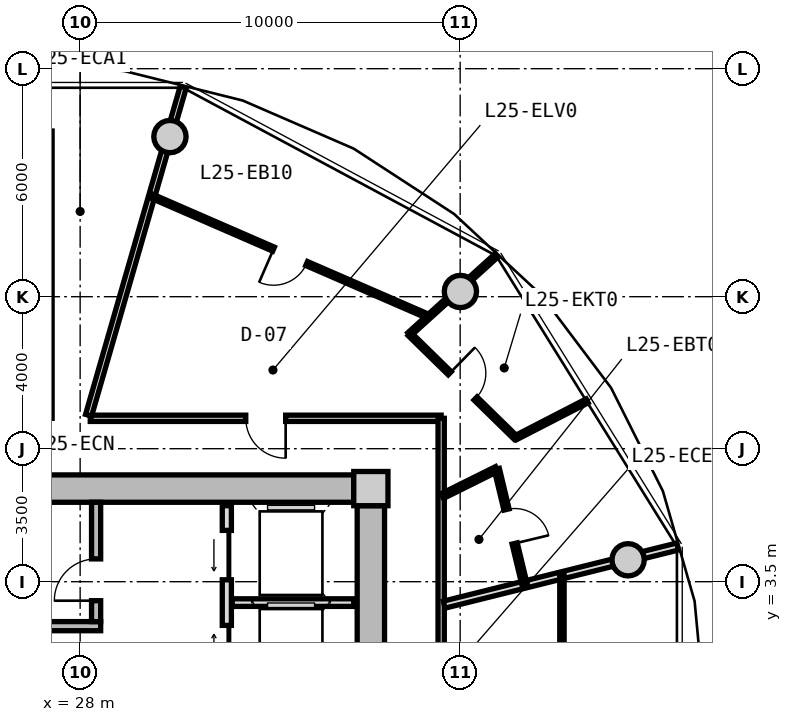
"""IFC4 building model, lengths in metres.
Left out: names, types, materials, properties, quantities, classifications, styles, units other than length and angle.
Written with IfcOpenShell. Run it as: python <this file> out.ifc"""

import sys

from ifc_helpers import new_model, si_unit, direction, frame, frame_2d, origin, origin_2d, place, context, subcontext, project, spatial, rectangle, circle, extrude, source, transform, mapped, element, fill, save


model = new_model("IFC4")
c1 = context("Model", 3, precision=1e-05, world=origin(), true_north=direction((0.0, 1.0)))
c2 = subcontext(c1, "Body", "Model", "MODEL_VIEW")
j1 = project(units=[si_unit("LENGTHUNIT", "METRE"), si_unit("PLANEANGLEUNIT", "RADIAN")], contexts=[c1])
p1 = place(None, origin())
s1 = spatial("IfcSite", under=j1, at=p1, CompositionType="ELEMENT")
p2 = place(p1, origin())
s2 = spatial("IfcBuilding", under=s1, at=p2, CompositionType="ELEMENT")
p3 = place(p2, frame((0.0, 0.0, 84.05)))
s3 = spatial("IfcBuildingStorey", under=s2, at=p3, CompositionType="ELEMENT", Elevation=84.05)
m1 = source(origin(), c2, "Body", "SweptSolid", [
    extrude(rectangle(XDim=0.9, YDim=0.9, at=origin_2d()), origin(), (0.0, 0.0, 1.0), 3.05),
])
p4 = place(p3, frame((35.65, 5.95, 0.0), z_axis=(0.0, 0.0, 1.0), x_axis=(1.0, 0.0, 0.0)))
e1 = element("IfcColumn", 1, at=p4, inside=s3, PredefinedType="COLUMN", context=c2, shape_type="MappedRepresentation", body=[
    mapped(m1, transform((0.0, 0.0, 0.0), x_axis=(1.0, 0.0, 0.0), y_axis=(0.0, 1.0, 0.0), z_axis=(0.0, 0.0, 1.0), scale=1.0)),
])
m2 = source(origin(), c2, "Body", "SweptSolid", [
    extrude(rectangle(XDim=14.4, YDim=0.72, at=frame_2d((7.2, 0.0))), origin(), (0.0, 0.0, 1.0), 2.79),
])
p5 = place(p3, frame((20.8, 5.95, 0.0), z_axis=(0.0, 0.0, 1.0), x_axis=(1.0, 0.0, 0.0)))
e2 = element("IfcWall", 2, at=p5, inside=s3, PredefinedType="SHEAR", context=c2, shape_type="MappedRepresentation", body=[
    mapped(m2, transform((0.0, 0.0, 0.0), x_axis=(1.0, 0.0, 0.0), y_axis=(0.0, 1.0, 0.0), z_axis=(0.0, 0.0, 1.0), scale=1.0)),
])
m3 = source(origin(), c2, "Body", "SweptSolid", [
    extrude(rectangle(XDim=11.0, YDim=0.72, at=frame_2d((5.5, 0.0))), origin(), (0.0, 0.0, 1.0), 2.79),
])
p6 = place(p3, frame((35.65, 5.5, 0.0), z_axis=(0.0, 0.0, 1.0), x_axis=(0.0, -1.0, 0.0)))
e3 = element("IfcWall", 3, at=p6, inside=s3, PredefinedType="SHEAR", context=c2, shape_type="MappedRepresentation", body=[
    mapped(m3, transform((0.0, 0.0, 0.0), x_axis=(1.0, 0.0, 0.0), y_axis=(0.0, 1.0, 0.0), z_axis=(0.0, 0.0, 1.0), scale=1.0)),
])
p7 = place(p6, frame((5.65, 0.0, 0.0)))
e4 = element("IfcOpeningElement", 4, at=p7, cuts=e3, PredefinedType="OPENING", context=c2, shape_type="SweptSolid", body=[
    extrude(rectangle(XDim=1.2, YDim=2.15, at=frame_2d((0.6, 1.075))), frame((0.0, 0.37, 0.0), z_axis=(0.0, -1.0, 0.0), x_axis=(1.0, 0.0, 0.0)), (0.0, 0.0, 1.0), 0.74),
])
m4 = source(origin(), c2, "Body", "SweptSolid", [
    extrude(circle(Radius=0.425, at=origin_2d()), origin(), (0.0, 0.0, 1.0), 3.05),
])
for number, where, z_axis, x_axis in (
    (5, (42.419, 4.076, 0.0), (0.0, 0.0, 1.0), (1.0, 0.0, 0.0)),
    (6, (38.006, 11.137, 0.0), (0.0, 0.0, 1.0), (1.0, 0.0, 0.0)),
    (7, (30.363, 15.213, 0.0), (0.0, 0.0, 1.0), (1.0, 0.0, 0.0)),
):
    element("IfcColumn", number, at=place(p3, frame(where, z_axis=z_axis, x_axis=x_axis)), inside=s3, PredefinedType="COLUMN", context=c2, shape_type="MappedRepresentation", body=[
        mapped(m4, transform((0.0, 0.0, 0.0), x_axis=(1.0, 0.0, 0.0), y_axis=(0.0, 1.0, 0.0), z_axis=(0.0, 0.0, 1.0), scale=1.0)),
    ])
m5 = source(origin(), c2, "Body", "SweptSolid", [
    extrude(rectangle(XDim=7.83, YDim=0.24, at=frame_2d((3.915, 0.0))), origin(), (0.0, 0.0, 1.0), 2.79),
])
p8 = place(p3, frame((20.71, 2.33, 0.0), z_axis=(0.0, 0.0, 1.0), x_axis=(1.0, 0.0, 0.0)))
e8 = element("IfcWall", 8, at=p8, inside=s3, PredefinedType="PARTITIONING", context=c2, shape_type="MappedRepresentation", body=[
    mapped(m5, transform((0.0, 0.0, 0.0), x_axis=(1.0, 0.0, 0.0), y_axis=(0.0, 1.0, 0.0), z_axis=(0.0, 0.0, 1.0), scale=1.0)),
])
m6 = source(origin(), c2, "Body", "SweptSolid", [
    extrude(rectangle(XDim=3.14, YDim=0.24, at=frame_2d((1.57, 0.0))), origin(), (0.0, 0.0, 1.0), 2.79),
])
p9 = place(p3, frame((28.42, 2.45, 0.0), z_axis=(0.0, 0.0, 1.0), x_axis=(0.0, 1.0, 0.0)))
e9 = element("IfcWall", 9, at=p9, inside=s3, PredefinedType="PARTITIONING", context=c2, shape_type="MappedRepresentation", body=[
    mapped(m6, transform((0.0, 0.0, 0.0), x_axis=(1.0, 0.0, 0.0), y_axis=(0.0, 1.0, 0.0), z_axis=(0.0, 0.0, 1.0), scale=1.0)),
])
p10 = place(p9, frame((0.55, 0.0, 0.0)))
e10 = element("IfcOpeningElement", 10, at=p10, cuts=e9, PredefinedType="OPENING", context=c2, shape_type="SweptSolid", body=[
    extrude(rectangle(XDim=1.1, YDim=2.15, at=frame_2d((0.55, 1.075))), frame((0.0, 0.13, 0.0), z_axis=(0.0, -1.0, 0.0), x_axis=(1.0, 0.0, 0.0)), (0.0, 0.0, 1.0), 0.26),
])
m7 = source(origin(), c2, "Body", "SweptSolid", [
    extrude(rectangle(XDim=5.0, YDim=0.24, at=frame_2d((2.5, 0.0))), origin(), (0.0, 0.0, 1.0), 2.775),
])
p11 = place(p3, frame((31.86, 0.5, 0.0), z_axis=(0.0, 0.0, 1.0), x_axis=(0.0, 1.0, 0.0)))
e11 = element("IfcWall", 11, at=p11, inside=s3, PredefinedType="PARTITIONING", context=c2, shape_type="MappedRepresentation", body=[
    mapped(m7, transform((0.0, 0.0, 0.0), x_axis=(1.0, 0.0, 0.0), y_axis=(0.0, 1.0, 0.0), z_axis=(0.0, 0.0, 1.0), scale=1.0)),
])
p12 = place(p11, frame((3.05, 0.0, 0.0)))
e12 = element("IfcOpeningElement", 12, at=p12, cuts=e11, PredefinedType="OPENING", context=c2, shape_type="SweptSolid", body=[
    extrude(rectangle(XDim=1.3, YDim=2.2, at=frame_2d((0.65, 1.1))), frame((0.0, 0.13, 0.0), z_axis=(0.0, -1.0, 0.0), x_axis=(1.0, 0.0, 0.0)), (0.0, 0.0, 1.0), 0.26),
])
p13 = place(p11, frame((0.55, 0.0, 0.0)))
e13 = element("IfcOpeningElement", 13, at=p13, cuts=e11, PredefinedType="OPENING", context=c2, shape_type="SweptSolid", body=[
    extrude(rectangle(XDim=1.3, YDim=2.2, at=frame_2d((0.65, 1.1))), frame((0.0, 0.13, 0.0), z_axis=(0.0, -1.0, 0.0), x_axis=(1.0, 0.0, 0.0)), (0.0, 0.0, 1.0), 0.26),
])
m8 = source(origin(), c2, "Body", "SweptSolid", [
    extrude(rectangle(XDim=3.2, YDim=0.2, at=frame_2d((1.6, 0.0))), origin(), (0.0, 0.0, 1.0), 2.775),
])
p14 = place(p3, frame((32.0, 2.95, 0.0), z_axis=(0.0, 0.0, 1.0), x_axis=(1.0, 0.0, 0.0)))
e14 = element("IfcWall", 14, at=p14, inside=s3, PredefinedType="PARTITIONING", context=c2, shape_type="MappedRepresentation", body=[
    mapped(m8, transform((0.0, 0.0, 0.0), x_axis=(1.0, 0.0, 0.0), y_axis=(0.0, 1.0, 0.0), z_axis=(0.0, 0.0, 1.0), scale=1.0)),
])
m9 = source(origin(), c2, "Body", "SweptSolid", [
    extrude(rectangle(XDim=9.234, YDim=0.165, at=frame_2d((4.617, 0.0))), origin(), (0.0, 0.0, 1.0), 2.775),
])
p15 = place(p3, frame((28.266, 7.8, 0.0), z_axis=(0.0, 0.0, 1.0), x_axis=(1.0, 0.0, 0.0)))
e15 = element("IfcWall", 15, at=p15, inside=s3, PredefinedType="PARTITIONING", context=c2, shape_type="MappedRepresentation", body=[
    mapped(m9, transform((0.0, 0.0, 0.0), x_axis=(1.0, 0.0, 0.0), y_axis=(0.0, 1.0, 0.0), z_axis=(0.0, 0.0, 1.0), scale=1.0)),
])
p16 = place(p15, frame((4.092, 0.0, 0.0)))
e16 = element("IfcOpeningElement", 16, at=p16, cuts=e15, PredefinedType="OPENING", context=c2, shape_type="SweptSolid", body=[
    extrude(rectangle(XDim=1.05, YDim=2.15, at=frame_2d((0.525, 1.075))), frame((0.0, 0.093, 0.0), z_axis=(0.0, -1.0, 0.0), x_axis=(1.0, 0.0, 0.0)), (0.0, 0.0, 1.0), 0.185),
])
m10 = source(origin(), c2, "Body", "SweptSolid", [
    extrude(rectangle(XDim=15.6, YDim=0.165, at=frame_2d((7.8, 0.0))), origin(), (0.0, 0.0, 1.0), 2.775),
])
p17 = place(p3, frame((37.5, 7.8, 0.0), z_axis=(0.0, 0.0, 1.0), x_axis=(0.0, -1.0, 0.0)))
e17 = element("IfcWall", 17, at=p17, inside=s3, PredefinedType="PARTITIONING", context=c2, shape_type="MappedRepresentation", body=[
    mapped(m10, transform((0.0, 0.0, 0.0), x_axis=(1.0, 0.0, 0.0), y_axis=(0.0, 1.0, 0.0), z_axis=(0.0, 0.0, 1.0), scale=1.0)),
])
p18 = place(p17, frame((9.177, 0.0, 0.0)))
e18 = element("IfcOpeningElement", 18, at=p18, cuts=e17, PredefinedType="OPENING", context=c2, shape_type="SweptSolid", body=[
    extrude(rectangle(XDim=1.05, YDim=2.15, at=frame_2d((0.525, 1.075))), frame((0.0, 0.093, 0.0), z_axis=(0.0, -1.0, 0.0), x_axis=(1.0, 0.0, 0.0)), (0.0, 0.0, 1.0), 0.185),
])
m11 = source(origin(), c2, "Body", "SweptSolid", [
    extrude(rectangle(XDim=8.989, YDim=0.165, at=frame_2d((4.495, 0.0))), origin(), (0.0, 0.0, 1.0), 2.275),
])
p19 = place(p3, frame((28.222, 7.88, 0.0), z_axis=(0.0, 0.0, 1.0), x_axis=(0.27702323008, 0.960863221274, 0.0)))
e19 = element("IfcWall", 19, at=p19, inside=s3, PredefinedType="PARTITIONING", context=c2, shape_type="MappedRepresentation", body=[
    mapped(m11, transform((0.0, 0.0, 0.0), x_axis=(1.0, 0.0, 0.0), y_axis=(0.0, 1.0, 0.0), z_axis=(0.0, 0.0, 1.0), scale=1.0)),
])
m12 = source(origin(), c2, "Body", "SweptSolid", [
    extrude(rectangle(XDim=6.331, YDim=0.19, at=frame_2d((3.165, 0.0))), origin(), (0.0, 0.0, 1.0), 2.275),
])
p20 = place(p3, frame((37.58, 2.896, 0.0), z_axis=(0.0, 0.0, 1.0), x_axis=(0.97036440661, 0.241646267062, 0.0)))
e20 = element("IfcWall", 20, at=p20, inside=s3, PredefinedType="PARTITIONING", context=c2, shape_type="MappedRepresentation", body=[
    mapped(m12, transform((0.0, 0.0, 0.0), x_axis=(1.0, 0.0, 0.0), y_axis=(0.0, 1.0, 0.0), z_axis=(0.0, 0.0, 1.0), scale=1.0)),
])
m13 = source(origin(), c2, "Body", "SweptSolid", [
    extrude(rectangle(XDim=7.375, YDim=0.115, at=frame_2d((3.688, 0.0))), origin(), (0.0, 0.0, 1.0), 2.775),
])
p21 = place(p3, frame((40.678, -3.688, 0.0), z_axis=(0.0, 0.0, 1.0), x_axis=(0.0, 1.0, 0.0)))
e21 = element("IfcWall", 21, at=p21, inside=s3, PredefinedType="PARTITIONING", context=c2, shape_type="MappedRepresentation", body=[
    mapped(m13, transform((0.0, 0.0, 0.0), x_axis=(1.0, 0.0, 0.0), y_axis=(0.0, 1.0, 0.0), z_axis=(0.0, 0.0, 1.0), scale=1.0)),
])
p22 = place(p21, frame((3.213, 0.0, 0.0)))
e22 = element("IfcOpeningElement", 22, at=p22, cuts=e21, PredefinedType="OPENING", context=c2, shape_type="SweptSolid", body=[
    extrude(rectangle(XDim=0.95, YDim=2.1, at=frame_2d((0.475, 1.05))), frame((0.0, 0.067, 0.0), z_axis=(0.0, -1.0, 0.0), x_axis=(1.0, 0.0, 0.0)), (0.0, 0.0, 1.0), 0.135),
])
m14 = source(origin(), c2, "Body", "SweptSolid", [
    extrude(rectangle(XDim=7.938, YDim=0.115, at=frame_2d((3.969, 0.0))), origin(), (0.0, 0.0, 1.0), 2.775),
])
p23 = place(p3, frame((37.164, 10.479, 0.0), z_axis=(0.0, 0.0, 1.0), x_axis=(-0.917052940979, 0.398765474235, 0.0)))
e23 = element("IfcWall", 23, at=p23, inside=s3, PredefinedType="PARTITIONING", context=c2, shape_type="MappedRepresentation", body=[
    mapped(m14, transform((0.0, 0.0, 0.0), x_axis=(1.0, 0.0, 0.0), y_axis=(0.0, 1.0, 0.0), z_axis=(0.0, 0.0, 1.0), scale=1.0)),
])
p24 = place(p23, frame((3.494, 0.0, 0.0)))
e24 = element("IfcOpeningElement", 24, at=p24, cuts=e23, PredefinedType="OPENING", context=c2, shape_type="SweptSolid", body=[
    extrude(rectangle(XDim=0.95, YDim=2.1, at=frame_2d((0.475, 1.05))), frame((0.0, 0.067, 0.0), z_axis=(0.0, -1.0, 0.0), x_axis=(1.0, 0.0, 0.0)), (0.0, 0.0, 1.0), 0.135),
])
m15 = source(origin(), c2, "Body", "SweptSolid", [
    extrude(rectangle(XDim=3.102, YDim=0.115, at=frame_2d((1.551, 0.0))), origin(), (0.0, 0.0, 1.0), 2.275),
])
p25 = place(p3, frame((36.661, 10.01, 0.0), z_axis=(0.0, 0.0, 1.0), x_axis=(0.741263481794, 0.671214161471, 0.0)))
e25 = element("IfcWall", 25, at=p25, inside=s3, PredefinedType="PARTITIONING", context=c2, shape_type="MappedRepresentation", body=[
    mapped(m15, transform((0.0, 0.0, 0.0), x_axis=(1.0, 0.0, 0.0), y_axis=(0.0, 1.0, 0.0), z_axis=(0.0, 0.0, 1.0), scale=1.0)),
])
m16 = source(origin(), c2, "Body", "SweptSolid", [
    extrude(rectangle(XDim=1.6, YDim=0.14, at=frame_2d((0.8, 0.0))), origin(), (0.0, 0.0, 1.0), 2.775),
])
p26 = place(p3, frame((37.53, 5.754, 0.0), z_axis=(0.0, 0.0, 1.0), x_axis=(0.895522919837, 0.445015393044, 0.0)))
e26 = element("IfcWall", 26, at=p26, inside=s3, PredefinedType="PARTITIONING", context=c2, shape_type="MappedRepresentation", body=[
    mapped(m16, transform((0.0, 0.0, 0.0), x_axis=(1.0, 0.0, 0.0), y_axis=(0.0, 1.0, 0.0), z_axis=(0.0, 0.0, 1.0), scale=1.0)),
])
m17 = source(origin(), c2, "Body", "SweptSolid", [
    extrude(rectangle(XDim=3.112, YDim=0.14, at=frame_2d((1.556, 0.0))), origin(), (0.0, 0.0, 1.0), 2.415),
])
p27 = place(p3, frame((38.963, 6.466, 0.0), z_axis=(0.0, 0.0, 1.0), x_axis=(0.233737944029, -0.972299631555, 0.0)))
e27 = element("IfcWall", 27, at=p27, inside=s3, PredefinedType="PARTITIONING", context=c2, shape_type="MappedRepresentation", body=[
    mapped(m17, transform((0.0, 0.0, 0.0), x_axis=(1.0, 0.0, 0.0), y_axis=(0.0, 1.0, 0.0), z_axis=(0.0, 0.0, 1.0), scale=1.0)),
])
p28 = place(p27, frame((1.096, 0.0, 0.0)))
e28 = element("IfcOpeningElement", 28, at=p28, cuts=e27, PredefinedType="OPENING", context=c2, shape_type="SweptSolid", body=[
    extrude(rectangle(XDim=0.92, YDim=2.1, at=frame_2d((0.46, 1.05))), frame((0.0, 0.08, 0.0), z_axis=(0.0, -1.0, 0.0), x_axis=(1.0, 0.0, 0.0)), (0.0, 0.0, 1.0), 0.16),
])
m18 = source(origin(), c2, "Body", "SweptSolid", [
    extrude(rectangle(XDim=2.117, YDim=0.115, at=frame_2d((1.059, 0.0))), origin(), (0.0, 0.0, 1.0), 2.775),
])
p29 = place(p3, frame((39.46, 7.289, 0.0), z_axis=(0.0, 0.0, 1.0), x_axis=(0.888941834945, 0.45802010227, 0.0)))
e29 = element("IfcWall", 29, at=p29, inside=s3, PredefinedType="PARTITIONING", context=c2, shape_type="MappedRepresentation", body=[
    mapped(m18, transform((0.0, 0.0, 0.0), x_axis=(1.0, 0.0, 0.0), y_axis=(0.0, 1.0, 0.0), z_axis=(0.0, 0.0, 1.0), scale=1.0)),
])
m19 = source(origin(), c2, "Body", "SweptSolid", [
    extrude(rectangle(XDim=3.902, YDim=0.115, at=frame_2d((1.951, 0.0))), origin(), (0.0, 0.0, 1.0), 2.775),
])
p30 = place(p3, frame((39.46, 7.289, 0.0), z_axis=(0.0, 0.0, 1.0), x_axis=(-0.714853061854, 0.699274695637, 0.0)))
e30 = element("IfcWall", 30, at=p30, inside=s3, PredefinedType="PARTITIONING", context=c2, shape_type="MappedRepresentation", body=[
    mapped(m19, transform((0.0, 0.0, 0.0), x_axis=(1.0, 0.0, 0.0), y_axis=(0.0, 1.0, 0.0), z_axis=(0.0, 0.0, 1.0), scale=1.0)),
])
p31 = place(p30, frame((1.476, 0.0, 0.0)))
e31 = element("IfcOpeningElement", 31, at=p31, cuts=e30, PredefinedType="OPENING", context=c2, shape_type="SweptSolid", body=[
    extrude(rectangle(XDim=0.95, YDim=2.1, at=frame_2d((0.475, 1.05))), frame((0.0, 0.067, 0.0), z_axis=(0.0, -1.0, 0.0), x_axis=(1.0, 0.0, 0.0)), (0.0, 0.0, 1.0), 0.135),
])
m20 = source(origin(), c2, "Body", "SweptSolid", [
    extrude(rectangle(XDim=1.1, YDim=2.15, at=frame_2d((0.55, 1.075))), frame((0.0, 0.025, 0.0), z_axis=(0.0, -1.0, 0.0), x_axis=(1.0, 0.0, 0.0)), (0.0, 0.0, 1.0), 0.05),
])
p32 = place(p10, origin())
e32 = element("IfcDoor", 32, at=p32, inside=s3, OperationType="SINGLE_SWING_LEFT", PredefinedType="DOOR", context=c2, shape_type="MappedRepresentation", body=[
    mapped(m20, transform((0.0, 0.0, 0.0), x_axis=(1.0, 0.0, 0.0), y_axis=(0.0, 1.0, 0.0), z_axis=(0.0, 0.0, 1.0), scale=1.0)),
])
fill(e10, e32)
m21 = source(origin(), c2, "Body", "SweptSolid", [
    extrude(rectangle(XDim=1.3, YDim=2.2, at=frame_2d((0.65, 1.1))), frame((0.0, 0.025, 0.0), z_axis=(0.0, -1.0, 0.0), x_axis=(1.0, 0.0, 0.0)), (0.0, 0.0, 1.0), 0.05),
])
p33 = place(p12, origin())
e33 = element("IfcDoor", 33, at=p33, inside=s3, OperationType="SLIDING_TO_LEFT", PredefinedType="DOOR", context=c2, shape_type="MappedRepresentation", body=[
    mapped(m21, transform((0.0, 0.0, 0.0), x_axis=(1.0, 0.0, 0.0), y_axis=(0.0, 1.0, 0.0), z_axis=(0.0, 0.0, 1.0), scale=1.0)),
])
fill(e12, e33)
p34 = place(p13, origin())
e34 = element("IfcDoor", 34, at=p34, inside=s3, OperationType="SLIDING_TO_RIGHT", PredefinedType="DOOR", context=c2, shape_type="MappedRepresentation", body=[
    mapped(m21, transform((0.0, 0.0, 0.0), x_axis=(1.0, 0.0, 0.0), y_axis=(0.0, 1.0, 0.0), z_axis=(0.0, 0.0, 1.0), scale=1.0)),
])
fill(e13, e34)
m22 = source(origin(), c2, "Body", "SweptSolid", [
    extrude(rectangle(XDim=1.05, YDim=2.15, at=frame_2d((0.525, 1.075))), frame((0.0, 0.025, 0.0), z_axis=(0.0, -1.0, 0.0), x_axis=(1.0, 0.0, 0.0)), (0.0, 0.0, 1.0), 0.05),
])
p35 = place(p16, frame((1.05, 0.0, 0.0), z_axis=(0.0, 0.0, 1.0), x_axis=(-1.0, 0.0, 0.0)))
e35 = element("IfcDoor", 35, at=p35, inside=s3, OperationType="SINGLE_SWING_LEFT", PredefinedType="DOOR", context=c2, shape_type="MappedRepresentation", body=[
    mapped(m22, transform((0.0, 0.0, 0.0), x_axis=(1.0, 0.0, 0.0), y_axis=(0.0, 1.0, 0.0), z_axis=(0.0, 0.0, 1.0), scale=1.0)),
])
fill(e16, e35)
m23 = source(origin(), c2, "Body", "SweptSolid", [
    extrude(rectangle(XDim=0.92, YDim=2.1, at=frame_2d((0.46, 1.05))), frame((0.0, 0.025, 0.0), z_axis=(0.0, -1.0, 0.0), x_axis=(1.0, 0.0, 0.0)), (0.0, 0.0, 1.0), 0.05),
])
p36 = place(p28, origin())
e36 = element("IfcDoor", 36, at=p36, inside=s3, OperationType="SINGLE_SWING_RIGHT", PredefinedType="DOOR", context=c2, shape_type="MappedRepresentation", body=[
    mapped(m23, transform((0.0, 0.0, 0.0), x_axis=(1.0, 0.0, 0.0), y_axis=(0.0, 1.0, 0.0), z_axis=(0.0, 0.0, 1.0), scale=1.0)),
])
fill(e28, e36)
m24 = source(origin(), c2, "Body", "SweptSolid", [
    extrude(rectangle(XDim=0.95, YDim=2.1, at=frame_2d((0.475, 1.05))), frame((0.0, 0.025, 0.0), z_axis=(0.0, -1.0, 0.0), x_axis=(1.0, 0.0, 0.0)), (0.0, 0.0, 1.0), 0.05),
])
p37 = place(p31, frame((0.95, 0.0, 0.0), z_axis=(0.0, 0.0, 1.0), x_axis=(-1.0, 0.0, 0.0)))
e37 = element("IfcDoor", 37, at=p37, inside=s3, OperationType="SINGLE_SWING_LEFT", PredefinedType="DOOR", context=c2, shape_type="MappedRepresentation", body=[
    mapped(m24, transform((0.0, 0.0, 0.0), x_axis=(1.0, 0.0, 0.0), y_axis=(0.0, 1.0, 0.0), z_axis=(0.0, 0.0, 1.0), scale=1.0)),
])
fill(e31, e37)
p38 = place(p24, origin())
e38 = element("IfcDoor", 38, at=p38, inside=s3, OperationType="SINGLE_SWING_RIGHT", PredefinedType="DOOR", context=c2, shape_type="MappedRepresentation", body=[
    mapped(m24, transform((0.0, 0.0, 0.0), x_axis=(1.0, 0.0, 0.0), y_axis=(0.0, 1.0, 0.0), z_axis=(0.0, 0.0, 1.0), scale=1.0)),
])
fill(e24, e38)
save(model, sys.argv[1])
